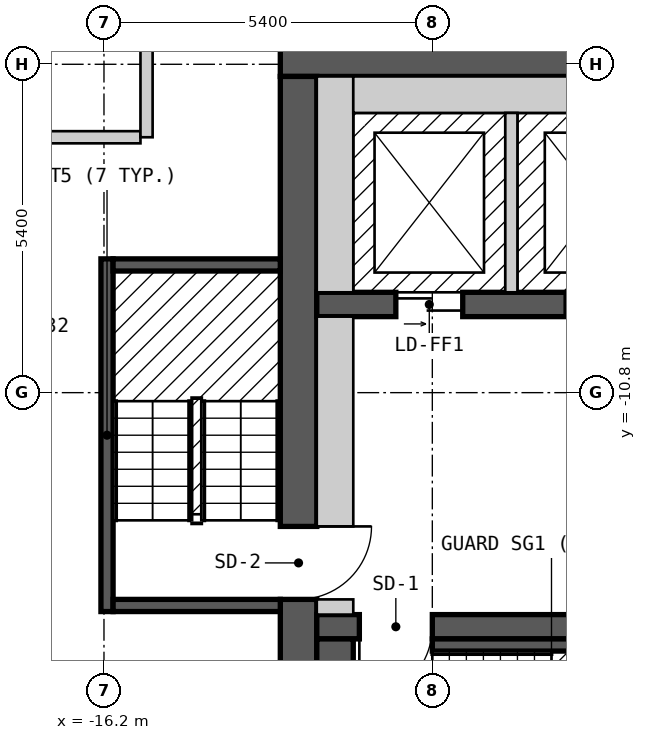
"""IFC4 building model, lengths in metres.
Left out: names, types, materials, properties, quantities, classifications, styles, units other than length and angle.
Written with IfcOpenShell. Run it as: python <this file> out.ifc"""

import sys

from ifc_helpers import new_model, si_unit, direction, frame, frame_2d, origin, origin_2d, place, context, subcontext, project, spatial, polyline, rectangle, outline, extrude, element, fill, save


model = new_model("IFC4")
c1 = context("Model", 3, precision=1e-05, world=origin(), true_north=direction((0.0, 1.0)))
c2 = subcontext(c1, "Body", "Model", "MODEL_VIEW")
j1 = project(units=[si_unit("LENGTHUNIT", "METRE"), si_unit("PLANEANGLEUNIT", "RADIAN")], contexts=[c1])
p1 = place(None, origin())
s1 = spatial("IfcSite", under=j1, at=p1, CompositionType="ELEMENT")
p2 = place(p1, origin())
s2 = spatial("IfcBuilding", under=s1, at=p2, CompositionType="ELEMENT")
p3 = place(p2, frame((0.0, 0.0, 190.2)))
s3 = spatial("IfcBuildingStorey", under=s2, at=p3, CompositionType="ELEMENT", Elevation=190.2)
p4 = place(p3, frame((-17.53, -15.736, 0.0), z_axis=(0.0, 0.0, 1.0), x_axis=(0.5, -0.866025403784, 0.0)))
e1 = element("IfcColumn", 1, at=p4, inside=s3, PredefinedType="COLUMN", context=c2, shape_type="SweptSolid", body=[
    extrude(rectangle(XDim=0.8, YDim=0.8, at=origin_2d()), origin(), (0.0, 0.0, 1.0), 3.0),
])
p5 = place(p3, frame((-13.3, -5.3, 0.0), z_axis=(0.0, 0.0, 1.0), x_axis=(1.0, 0.0, 0.0)))
e2 = element("IfcWall", 2, at=p5, inside=s3, PredefinedType="SHEAR", context=c2, shape_type="SweptSolid", body=[
    extrude(rectangle(XDim=26.6, YDim=0.6, at=frame_2d((13.3, 0.0))), origin(), (0.0, 0.0, 1.0), 2.7),
])
p6 = place(p5, frame((23.65, 0.0, 0.0)))
e3 = element("IfcOpeningElement", 3, at=p6, cuts=e2, PredefinedType="OPENING", context=c2, shape_type="SweptSolid", body=[
    extrude(rectangle(XDim=1.2, YDim=2.1, at=frame_2d((0.6, 1.05))), frame((0.0, 0.31, 0.0), z_axis=(0.0, -1.0, 0.0), x_axis=(1.0, 0.0, 0.0)), (0.0, 0.0, 1.0), 0.62),
])
p7 = place(p3, frame((-13.0, -18.4, 0.0), z_axis=(0.0, 0.0, 1.0), x_axis=(0.0, 1.0, 0.0)))
e4 = element("IfcWall", 4, at=p7, inside=s3, PredefinedType="SHEAR", context=c2, shape_type="SweptSolid", body=[
    extrude(rectangle(XDim=12.8, YDim=0.6, at=frame_2d((6.4, 0.0))), origin(), (0.0, 0.0, 1.0), 2.7),
])
p8 = place(p7, frame((4.2, 0.0, 0.0)))
e5 = element("IfcOpeningElement", 5, at=p8, cuts=e4, PredefinedType="OPENING", context=c2, shape_type="SweptSolid", body=[
    extrude(rectangle(XDim=1.2, YDim=2.1, at=frame_2d((0.6, 1.05))), frame((0.0, 0.31, 0.0), z_axis=(0.0, -1.0, 0.0), x_axis=(1.0, 0.0, 0.0)), (0.0, 0.0, 1.0), 0.62),
])
p9 = place(p3, frame((-12.7, -14.65, 0.0), z_axis=(0.0, 0.0, 1.0), x_axis=(1.0, 0.0, 0.0)))
e6 = element("IfcWall", 6, at=p9, inside=s3, PredefinedType="SHEAR", context=c2, shape_type="SweptSolid", body=[
    extrude(rectangle(XDim=25.4, YDim=0.4, at=frame_2d((12.7, 0.0))), origin(), (0.0, 0.0, 1.0), 2.7),
])
p10 = place(p9, frame((1.9, 0.0, 0.0), z_axis=(0.0, 0.0, 1.0), x_axis=(-1.0, 0.0, 0.0)))
e7 = element("IfcOpeningElement", 7, at=p10, cuts=e6, PredefinedType="OPENING", context=c2, shape_type="SweptSolid", body=[
    extrude(rectangle(XDim=1.2, YDim=2.1, at=frame_2d((0.6, 1.05))), frame((0.0, 0.21, 0.0), z_axis=(0.0, -1.0, 0.0), x_axis=(1.0, 0.0, 0.0)), (0.0, 0.0, 1.0), 0.42),
])
p11 = place(p9, frame((24.75, 0.0, 0.0), z_axis=(0.0, 0.0, 1.0), x_axis=(-1.0, 0.0, 0.0)))
e8 = element("IfcOpeningElement", 8, at=p11, cuts=e6, PredefinedType="OPENING", context=c2, shape_type="SweptSolid", body=[
    extrude(rectangle(XDim=1.2, YDim=2.1, at=frame_2d((0.6, 1.05))), frame((0.0, 0.21, 0.0), z_axis=(0.0, -1.0, 0.0), x_axis=(1.0, 0.0, 0.0)), (0.0, 0.0, 1.0), 0.42),
])
p12 = place(p9, frame((8.6, 0.0, 0.0), z_axis=(0.0, 0.0, 1.0), x_axis=(-1.0, 0.0, 0.0)))
e9 = element("IfcOpeningElement", 9, at=p12, cuts=e6, PredefinedType="OPENING", context=c2, shape_type="SweptSolid", body=[
    extrude(rectangle(XDim=1.0, YDim=2.1, at=frame_2d((0.5, 1.05))), frame((0.0, 0.21, 0.0), z_axis=(0.0, -1.0, 0.0), x_axis=(1.0, 0.0, 0.0)), (0.0, 0.0, 1.0), 0.42),
])
p13 = place(p9, frame((11.35, 0.0, 0.0), z_axis=(0.0, 0.0, 1.0), x_axis=(-1.0, 0.0, 0.0)))
e10 = element("IfcOpeningElement", 10, at=p13, cuts=e6, PredefinedType="OPENING", context=c2, shape_type="SweptSolid", body=[
    extrude(rectangle(XDim=0.9, YDim=2.1, at=frame_2d((0.45, 1.05))), frame((0.0, 0.21, 0.0), z_axis=(0.0, -1.0, 0.0), x_axis=(1.0, 0.0, 0.0)), (0.0, 0.0, 1.0), 0.42),
])
p14 = place(p9, frame((14.15, 0.0, 0.0), z_axis=(0.0, 0.0, 1.0), x_axis=(-1.0, 0.0, 0.0)))
e11 = element("IfcOpeningElement", 11, at=p14, cuts=e6, PredefinedType="OPENING", context=c2, shape_type="SweptSolid", body=[
    extrude(rectangle(XDim=1.0, YDim=2.1, at=frame_2d((0.5, 1.05))), frame((0.0, 0.21, 0.0), z_axis=(0.0, -1.0, 0.0), x_axis=(1.0, 0.0, 0.0)), (0.0, 0.0, 1.0), 0.42),
])
p15 = place(p9, frame((17.75, 0.0, 0.0), z_axis=(0.0, 0.0, 1.0), x_axis=(-1.0, 0.0, 0.0)))
e12 = element("IfcOpeningElement", 12, at=p15, cuts=e6, PredefinedType="OPENING", context=c2, shape_type="SweptSolid", body=[
    extrude(rectangle(XDim=1.0, YDim=2.1, at=frame_2d((0.5, 1.05))), frame((0.0, 0.21, 0.0), z_axis=(0.0, -1.0, 0.0), x_axis=(1.0, 0.0, 0.0)), (0.0, 0.0, 1.0), 0.42),
])
p16 = place(p3, frame((-12.7, -9.35, 0.0), z_axis=(0.0, 0.0, 1.0), x_axis=(1.0, 0.0, 0.0)))
e13 = element("IfcWall", 13, at=p16, inside=s3, PredefinedType="SHEAR", context=c2, shape_type="SweptSolid", body=[
    extrude(rectangle(XDim=22.9, YDim=0.4, at=frame_2d((11.45, 0.0))), origin(), (0.0, 0.0, 1.0), 2.7),
])
p17 = place(p16, frame((1.3, 0.0, 0.0)))
e14 = element("IfcOpeningElement", 14, at=p17, cuts=e13, PredefinedType="OPENING", context=c2, shape_type="SweptSolid", body=[
    extrude(rectangle(XDim=1.1, YDim=2.1, at=frame_2d((0.55, 1.05))), frame((0.0, 0.21, 0.0), z_axis=(0.0, -1.0, 0.0), x_axis=(1.0, 0.0, 0.0)), (0.0, 0.0, 1.0), 0.42),
])
p18 = place(p16, frame((4.1, 0.0, 0.0)))
e15 = element("IfcOpeningElement", 15, at=p18, cuts=e13, PredefinedType="OPENING", context=c2, shape_type="SweptSolid", body=[
    extrude(rectangle(XDim=1.1, YDim=2.1, at=frame_2d((0.55, 1.05))), frame((0.0, 0.21, 0.0), z_axis=(0.0, -1.0, 0.0), x_axis=(1.0, 0.0, 0.0)), (0.0, 0.0, 1.0), 0.42),
])
p19 = place(p16, frame((6.9, 0.0, 0.0)))
e16 = element("IfcOpeningElement", 16, at=p19, cuts=e13, PredefinedType="OPENING", context=c2, shape_type="SweptSolid", body=[
    extrude(rectangle(XDim=1.1, YDim=2.1, at=frame_2d((0.55, 1.05))), frame((0.0, 0.21, 0.0), z_axis=(0.0, -1.0, 0.0), x_axis=(1.0, 0.0, 0.0)), (0.0, 0.0, 1.0), 0.42),
])
p20 = place(p16, frame((9.2, 0.0, 0.0)))
e17 = element("IfcOpeningElement", 17, at=p20, cuts=e13, PredefinedType="OPENING", context=c2, shape_type="SweptSolid", body=[
    extrude(rectangle(XDim=1.1, YDim=2.1, at=frame_2d((0.55, 1.05))), frame((0.0, 0.21, 0.0), z_axis=(0.0, -1.0, 0.0), x_axis=(1.0, 0.0, 0.0)), (0.0, 0.0, 1.0), 0.42),
])
p21 = place(p16, frame((11.5, 0.0, 0.0)))
e18 = element("IfcOpeningElement", 18, at=p21, cuts=e13, PredefinedType="OPENING", context=c2, shape_type="SweptSolid", body=[
    extrude(rectangle(XDim=1.1, YDim=2.1, at=frame_2d((0.55, 1.05))), frame((0.0, 0.21, 0.0), z_axis=(0.0, -1.0, 0.0), x_axis=(1.0, 0.0, 0.0)), (0.0, 0.0, 1.0), 0.42),
])
p22 = place(p16, frame((13.8, 0.0, 0.0)))
e19 = element("IfcOpeningElement", 19, at=p22, cuts=e13, PredefinedType="OPENING", context=c2, shape_type="SweptSolid", body=[
    extrude(rectangle(XDim=1.1, YDim=2.1, at=frame_2d((0.55, 1.05))), frame((0.0, 0.21, 0.0), z_axis=(0.0, -1.0, 0.0), x_axis=(1.0, 0.0, 0.0)), (0.0, 0.0, 1.0), 0.42),
])
p23 = place(p16, frame((16.1, 0.0, 0.0)))
e20 = element("IfcOpeningElement", 20, at=p23, cuts=e13, PredefinedType="OPENING", context=c2, shape_type="SweptSolid", body=[
    extrude(rectangle(XDim=1.1, YDim=2.1, at=frame_2d((0.55, 1.05))), frame((0.0, 0.21, 0.0), z_axis=(0.0, -1.0, 0.0), x_axis=(1.0, 0.0, 0.0)), (0.0, 0.0, 1.0), 0.42),
])
p24 = place(p16, frame((18.4, 0.0, 0.0)))
e21 = element("IfcOpeningElement", 21, at=p24, cuts=e13, PredefinedType="OPENING", context=c2, shape_type="SweptSolid", body=[
    extrude(rectangle(XDim=1.1, YDim=2.1, at=frame_2d((0.55, 1.05))), frame((0.0, 0.21, 0.0), z_axis=(0.0, -1.0, 0.0), x_axis=(1.0, 0.0, 0.0)), (0.0, 0.0, 1.0), 0.42),
])
p25 = place(p16, frame((20.8, 0.0, 0.0)))
e22 = element("IfcOpeningElement", 22, at=p25, cuts=e13, PredefinedType="OPENING", context=c2, shape_type="SweptSolid", body=[
    extrude(rectangle(XDim=1.1, YDim=2.1, at=frame_2d((0.55, 1.05))), frame((0.0, 0.21, 0.0), z_axis=(0.0, -1.0, 0.0), x_axis=(1.0, 0.0, 0.0)), (0.0, 0.0, 1.0), 0.42),
])
p26 = place(p3, frame((-26.024, -3.025, 0.0), z_axis=(0.0, 0.0, 1.0), x_axis=(0.500018670445, -0.86601462413, 0.0)))
e23 = element("IfcWall", 23, at=p26, inside=s3, PredefinedType="SOLIDWALL", context=c2, shape_type="SweptSolid", body=[
    extrude(outline(polyline([(0.0, -0.15), (20.785, -0.15), (20.705, 0.15), (0.08, 0.15), (0.0, -0.15)])), origin(), (0.0, 0.0, 1.0), 2.7),
])
p27 = place(p26, frame((1.13, 0.0, 0.15)))
e24 = element("IfcOpeningElement", 24, at=p27, cuts=e23, PredefinedType="OPENING", context=c2, shape_type="SweptSolid", body=[
    extrude(rectangle(XDim=1.5, YDim=2.1, at=frame_2d((0.75, 1.05))), frame((0.0, 0.16, 0.0), z_axis=(0.0, -1.0, 0.0), x_axis=(1.0, 0.0, 0.0)), (0.0, 0.0, 1.0), 0.32),
])
p28 = place(p26, frame((3.562, 0.0, 0.15)))
e25 = element("IfcOpeningElement", 25, at=p28, cuts=e23, PredefinedType="OPENING", context=c2, shape_type="SweptSolid", body=[
    extrude(rectangle(XDim=1.5, YDim=2.1, at=frame_2d((0.75, 1.05))), frame((0.0, 0.16, 0.0), z_axis=(0.0, -1.0, 0.0), x_axis=(1.0, 0.0, 0.0)), (0.0, 0.0, 1.0), 0.32),
])
p29 = place(p26, frame((5.994, 0.0, 0.15)))
e26 = element("IfcOpeningElement", 26, at=p29, cuts=e23, PredefinedType="OPENING", context=c2, shape_type="SweptSolid", body=[
    extrude(rectangle(XDim=1.5, YDim=2.1, at=frame_2d((0.75, 1.05))), frame((0.0, 0.16, 0.0), z_axis=(0.0, -1.0, 0.0), x_axis=(1.0, 0.0, 0.0)), (0.0, 0.0, 1.0), 0.32),
])
p30 = place(p26, frame((8.425, 0.0, 0.15)))
e27 = element("IfcOpeningElement", 27, at=p30, cuts=e23, PredefinedType="OPENING", context=c2, shape_type="SweptSolid", body=[
    extrude(rectangle(XDim=1.5, YDim=2.1, at=frame_2d((0.75, 1.05))), frame((0.0, 0.16, 0.0), z_axis=(0.0, -1.0, 0.0), x_axis=(1.0, 0.0, 0.0)), (0.0, 0.0, 1.0), 0.32),
])
p31 = place(p26, frame((10.857, 0.0, 0.15)))
e28 = element("IfcOpeningElement", 28, at=p31, cuts=e23, PredefinedType="OPENING", context=c2, shape_type="SweptSolid", body=[
    extrude(rectangle(XDim=1.5, YDim=2.1, at=frame_2d((0.75, 1.05))), frame((0.0, 0.16, 0.0), z_axis=(0.0, -1.0, 0.0), x_axis=(1.0, 0.0, 0.0)), (0.0, 0.0, 1.0), 0.32),
])
p32 = place(p26, frame((13.289, 0.0, 0.15)))
e29 = element("IfcOpeningElement", 29, at=p32, cuts=e23, PredefinedType="OPENING", context=c2, shape_type="SweptSolid", body=[
    extrude(rectangle(XDim=1.5, YDim=2.1, at=frame_2d((0.75, 1.05))), frame((0.0, 0.16, 0.0), z_axis=(0.0, -1.0, 0.0), x_axis=(1.0, 0.0, 0.0)), (0.0, 0.0, 1.0), 0.32),
])
p33 = place(p26, frame((15.722, 0.0, 0.15)))
e30 = element("IfcOpeningElement", 30, at=p33, cuts=e23, PredefinedType="OPENING", context=c2, shape_type="SweptSolid", body=[
    extrude(rectangle(XDim=1.5, YDim=2.1, at=frame_2d((0.75, 1.05))), frame((0.0, 0.16, 0.0), z_axis=(0.0, -1.0, 0.0), x_axis=(1.0, 0.0, 0.0)), (0.0, 0.0, 1.0), 0.32),
])
p34 = place(p26, frame((18.154, 0.0, 0.15)))
e31 = element("IfcOpeningElement", 31, at=p34, cuts=e23, PredefinedType="OPENING", context=c2, shape_type="SweptSolid", body=[
    extrude(rectangle(XDim=1.5, YDim=2.1, at=frame_2d((0.75, 1.05))), frame((0.0, 0.16, 0.0), z_axis=(0.0, -1.0, 0.0), x_axis=(1.0, 0.0, 0.0)), (0.0, 0.0, 1.0), 0.32),
])
p35 = place(p3, frame((-18.149, -6.6, 0.0), z_axis=(0.0, 0.0, 1.0), x_axis=(1.0, 0.0, 0.0)))
e32 = element("IfcWall", 32, at=p35, inside=s3, PredefinedType="PARTITIONING", context=c2, shape_type="SweptSolid", body=[
    extrude(rectangle(XDim=2.549, YDim=0.2, at=frame_2d((1.274, 0.0))), origin(), (0.0, 0.0, 1.0), 2.7),
])
p36 = place(p3, frame((-15.5, -6.6, 0.0), z_axis=(0.0, 0.0, 1.0), x_axis=(0.0, 1.0, 0.0)))
e33 = element("IfcWall", 33, at=p36, inside=s3, PredefinedType="PARTITIONING", context=c2, shape_type="SweptSolid", body=[
    extrude(rectangle(XDim=3.799, YDim=0.2, at=frame_2d((1.899, 0.0))), origin(), (0.0, 0.0, 1.0), 2.7),
])
p37 = place(p3, frame((-23.13, -7.737, 0.0), z_axis=(0.0, 0.0, 1.0), x_axis=(0.866033148899, 0.499986584829, 0.0)))
e34 = element("IfcWall", 34, at=p37, inside=s3, PredefinedType="PARTITIONING", context=c2, shape_type="SweptSolid", body=[
    extrude(rectangle(XDim=8.695, YDim=0.2, at=frame_2d((4.347, 0.0))), origin(), (0.0, 0.0, 1.0), 2.7),
])
p38 = place(p3, frame((-16.15, -14.4, 0.0), z_axis=(0.0, 0.0, 1.0), x_axis=(0.0, 1.0, 0.0)))
e35 = element("IfcWall", 35, at=p38, inside=s3, PredefinedType="SOLIDWALL", context=c2, shape_type="SweptSolid", body=[
    extrude(rectangle(XDim=5.8, YDim=0.2, at=frame_2d((2.9, 0.0))), origin(), (0.0, 0.0, 1.0), 2.7),
])
for number, where, z_axis, x_axis in (
    (36, (-16.05, -14.3, 0.0), (0.0, 0.0, 1.0), (1.0, 0.0, 0.0)),
    (37, (-16.05, -8.7, 0.0), (0.0, 0.0, 1.0), (1.0, 0.0, 0.0)),
):
    element("IfcWall", number, at=place(p3, frame(where, z_axis=z_axis, x_axis=x_axis)), inside=s3, PredefinedType="SOLIDWALL", context=c2, shape_type="SweptSolid", body=[
        extrude(rectangle(XDim=2.75, YDim=0.2, at=frame_2d((1.375, 0.0))), origin(), (0.0, 0.0, 1.0), 2.7),
    ])
p39 = place(p3, frame((-12.4, -18.4, 0.0), z_axis=(0.0, 0.0, 1.0), x_axis=(0.0, 1.0, 0.0)))
e38 = element("IfcWall", 38, at=p39, inside=s3, PredefinedType="SOLIDWALL", context=c2, shape_type="SweptSolid", body=[
    extrude(rectangle(XDim=3.55, YDim=0.6, at=frame_2d((1.775, 0.0))), origin(), (0.0, 0.0, 1.0), 2.7),
])
p40 = place(p3, frame((-12.7, -14.325, 0.0), z_axis=(0.0, 0.0, 1.0), x_axis=(1.0, 0.0, 0.0)))
e39 = element("IfcWall", 39, at=p40, inside=s3, PredefinedType="PARTITIONING", context=c2, shape_type="SweptSolid", body=[
    extrude(rectangle(XDim=0.6, YDim=0.25, at=frame_2d((0.3, 0.0))), origin(), (0.0, 0.0, 1.0), 2.7),
])
p41 = place(p3, frame((-12.4, -13.0, 0.0), z_axis=(0.0, 0.0, 1.0), x_axis=(0.0, 1.0, 0.0)))
e40 = element("IfcWall", 40, at=p41, inside=s3, PredefinedType="PARTITIONING", context=c2, shape_type="SweptSolid", body=[
    extrude(rectangle(XDim=3.45, YDim=0.6, at=frame_2d((1.725, 0.0))), origin(), (0.0, 0.0, 1.0), 2.7),
])
p42 = place(p3, frame((-12.4, -9.15, 0.0), z_axis=(0.0, 0.0, 1.0), x_axis=(0.0, 1.0, 0.0)))
e41 = element("IfcWall", 41, at=p42, inside=s3, PredefinedType="SOLIDWALL", context=c2, shape_type="SweptSolid", body=[
    extrude(rectangle(XDim=3.55, YDim=0.6, at=frame_2d((1.775, 0.0))), origin(), (0.0, 0.0, 1.0), 2.7),
])
p43 = place(p3, frame((-12.1, -5.9, 0.0), z_axis=(0.0, 0.0, 1.0), x_axis=(1.0, 0.0, 0.0)))
e42 = element("IfcWall", 42, at=p43, inside=s3, PredefinedType="SOLIDWALL", context=c2, shape_type="SweptSolid", body=[
    extrude(rectangle(XDim=5.4, YDim=0.6, at=frame_2d((2.7, 0.0))), origin(), (0.0, 0.0, 1.0), 2.7),
])
p44 = place(p3, frame((-10.8, -14.95, 0.0), z_axis=(0.0, 0.0, 1.0), x_axis=(1.0, 0.0, 0.0)))
e43 = element("IfcWall", 43, at=p44, inside=s3, PredefinedType="SOLIDWALL", context=c2, shape_type="SweptSolid", body=[
    extrude(rectangle(XDim=4.1, YDim=0.2, at=frame_2d((2.05, 0.0))), origin(), (0.0, 0.0, 1.0), 2.7),
])
p45 = place(p3, frame((-9.5, -9.15, 0.0), z_axis=(0.0, 0.0, 1.0), x_axis=(0.0, 1.0, 0.0)))
e44 = element("IfcWall", 44, at=p45, inside=s3, PredefinedType="SOLIDWALL", context=c2, shape_type="SweptSolid", body=[
    extrude(rectangle(XDim=2.95, YDim=0.2, at=frame_2d((1.475, 0.0))), origin(), (0.0, 0.0, 1.0), 2.7),
])
p46 = place(p17, origin())
e45 = element("IfcDoor", 45, at=p46, inside=s3, OperationType="DOUBLE_DOOR_SLIDING", PredefinedType="DOOR", context=c2, shape_type="SweptSolid", body=[
    extrude(rectangle(XDim=1.1, YDim=2.1, at=frame_2d((0.55, 1.05))), frame((0.0, 0.025, 0.0), z_axis=(0.0, -1.0, 0.0), x_axis=(1.0, 0.0, 0.0)), (0.0, 0.0, 1.0), 0.05),
])
fill(e14, e45)
p47 = place(p10, origin())
e46 = element("IfcDoor", 46, at=p47, inside=s3, OperationType="SINGLE_SWING_RIGHT", PredefinedType="DOOR", context=c2, shape_type="SweptSolid", body=[
    extrude(rectangle(XDim=1.2, YDim=2.1, at=frame_2d((0.6, 1.05))), frame((0.0, 0.025, 0.0), z_axis=(0.0, -1.0, 0.0), x_axis=(1.0, 0.0, 0.0)), (0.0, 0.0, 1.0), 0.05),
])
fill(e7, e46)
p48 = place(p8, origin())
e47 = element("IfcDoor", 47, at=p48, inside=s3, OperationType="SINGLE_SWING_RIGHT", PredefinedType="DOOR", context=c2, shape_type="SweptSolid", body=[
    extrude(rectangle(XDim=1.2, YDim=2.1, at=frame_2d((0.6, 1.05))), frame((0.0, 0.025, 0.0), z_axis=(0.0, -1.0, 0.0), x_axis=(1.0, 0.0, 0.0)), (0.0, 0.0, 1.0), 0.05),
])
fill(e5, e47)
save(model, sys.argv[1])
